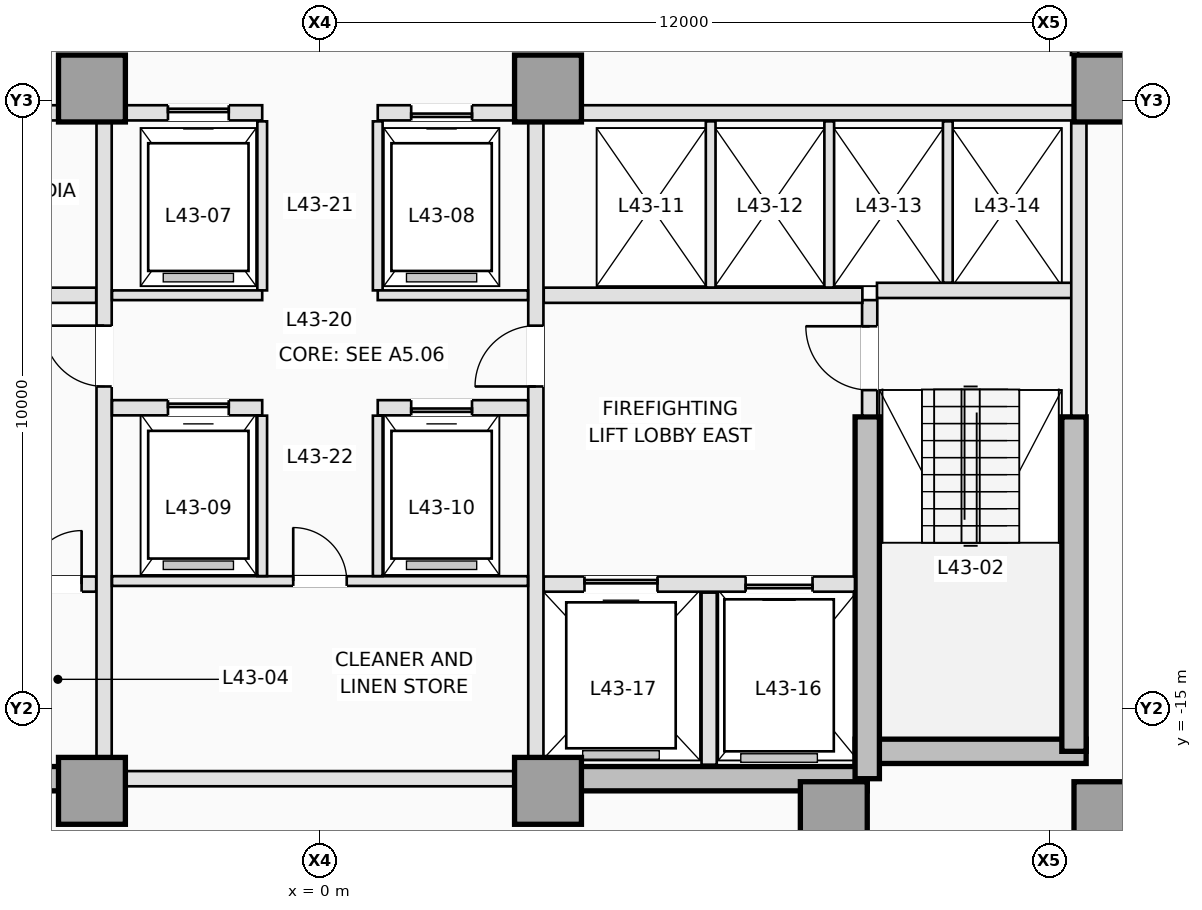
"""IFC4 building model, lengths in metres.
Left out: names, types, materials, properties, quantities, classifications, styles, units other than length and angle.
Written with IfcOpenShell. Run it as: python <this file> out.ifc"""

import sys

from ifc_helpers import new_model, si_unit, direction, frame, frame_2d, origin, origin_2d, place, context, subcontext, project, spatial, rectangle, extrude, element, fill, save


model = new_model("IFC4")
c1 = context("Model", 3, precision=1e-05, world=origin(), true_north=direction((0.0, 1.0)))
c2 = subcontext(c1, "Body", "Model", "MODEL_VIEW")
j1 = project(units=[si_unit("LENGTHUNIT", "METRE"), si_unit("PLANEANGLEUNIT", "RADIAN")], contexts=[c1])
p1 = place(None, origin())
s1 = spatial("IfcSite", under=j1, at=p1, CompositionType="ELEMENT")
p2 = place(p1, origin())
s2 = spatial("IfcBuilding", under=s1, at=p2, CompositionType="ELEMENT")
p3 = place(p2, frame((0.0, 0.0, 158.0)))
s3 = spatial("IfcBuildingStorey", under=s2, at=p3, CompositionType="ELEMENT", Elevation=158.0)
for number, where, z_axis, x_axis in (
    (1, (-9.0, -16.15, 0.0), (0.0, 0.0, 1.0), (1.0, 0.0, 0.0)),
    (2, (3.75, -16.15, 0.0), (0.0, 0.0, 1.0), (1.0, 0.0, 0.0)),
):
    element("IfcWall", number, at=place(p3, frame(where, z_axis=z_axis, x_axis=x_axis)), inside=s3, PredefinedType="SHEAR", context=c2, shape_type="SweptSolid", body=[
        extrude(rectangle(XDim=5.25, YDim=0.4, at=frame_2d((2.625, 0.0))), origin(), (0.0, 0.0, 1.0), 3.5),
    ])
p4 = place(p3, frame((8.8, -15.7, 0.0), z_axis=(0.0, 0.0, 1.0), x_axis=(1.0, 0.0, 0.0)))
e3 = element("IfcWall", 3, at=p4, inside=s3, PredefinedType="SHEAR", context=c2, shape_type="SweptSolid", body=[
    extrude(rectangle(XDim=3.8, YDim=0.4, at=frame_2d((1.9, 0.0))), origin(), (0.0, 0.0, 1.0), 3.5),
])
p5 = place(p3, frame((12.4, -15.7, 0.0), z_axis=(0.0, 0.0, 1.0), x_axis=(0.0, 1.0, 0.0)))
e4 = element("IfcWall", 4, at=p5, inside=s3, PredefinedType="SHEAR", context=c2, shape_type="SweptSolid", body=[
    extrude(rectangle(XDim=5.5, YDim=0.4, at=frame_2d((2.75, 0.0))), origin(), (0.0, 0.0, 1.0), 3.5),
])
p6 = place(p3, frame((9.0, -16.15, 0.0), z_axis=(0.0, 0.0, 1.0), x_axis=(0.0, 1.0, 0.0)))
e5 = element("IfcWall", 5, at=p6, inside=s3, PredefinedType="SHEAR", context=c2, shape_type="SweptSolid", body=[
    extrude(rectangle(XDim=5.95, YDim=0.4, at=frame_2d((2.975, 0.0))), origin(), (0.0, 0.0, 1.0), 3.5),
])
for number, where, z_axis, x_axis in (
    (6, (-3.75, -16.35, 0.0), (0.0, 0.0, 1.0), (1.0, 0.0, 0.0)),
    (7, (3.75, -16.35, 0.0), (0.0, 0.0, 1.0), (1.0, 0.0, 0.0)),
    (8, (8.45, -16.75, 0.0), (0.0, 0.0, 1.0), (1.0, 0.0, 0.0)),
    (9, (12.95, -16.75, 0.0), (0.0, 0.0, 1.0), (1.0, 0.0, 0.0)),
    (10, (-3.75, -4.8, 0.0), (0.0, 0.0, 1.0), (1.0, 0.0, 0.0)),
    (11, (3.75, -4.8, 0.0), (0.0, 0.0, 1.0), (1.0, 0.0, 0.0)),
    (12, (12.95, -4.8, 0.0), (0.0, 0.0, 1.0), (1.0, 0.0, 0.0)),
):
    element("IfcColumn", number, at=place(p3, frame(where, z_axis=z_axis, x_axis=x_axis)), inside=s3, PredefinedType="COLUMN", context=c2, shape_type="SweptSolid", body=[
        extrude(rectangle(XDim=1.1, YDim=1.1, at=origin_2d()), origin(), (0.0, 0.0, 1.0), 3.5),
    ])
p7 = place(p3, frame((9.04, -10.18, 0.0), z_axis=(0.0, 0.0, 1.0), x_axis=(0.0, 1.0, 0.0)))
e13 = element("IfcWall", 13, at=p7, inside=s3, PredefinedType="PARTITIONING", context=c2, shape_type="SweptSolid", body=[
    extrude(rectangle(XDim=1.9, YDim=0.25, at=frame_2d((0.95, 0.0))), origin(), (0.0, 0.0, 1.0), 3.25),
])
p8 = place(p7, frame((0.42, 0.0, 0.0)))
e14 = element("IfcOpeningElement", 14, at=p8, cuts=e13, PredefinedType="OPENING", context=c2, shape_type="SweptSolid", body=[
    extrude(rectangle(XDim=1.05, YDim=2.15, at=frame_2d((0.525, 1.075))), frame((0.0, 0.135, 0.0), z_axis=(0.0, -1.0, 0.0), x_axis=(1.0, 0.0, 0.0)), (0.0, 0.0, 1.0), 0.27),
])
p9 = place(p3, frame((9.16, -8.12, 0.0), z_axis=(0.0, 0.0, 1.0), x_axis=(1.0, 0.0, 0.0)))
e15 = element("IfcWall", 15, at=p9, inside=s3, PredefinedType="PARTITIONING", context=c2, shape_type="SweptSolid", body=[
    extrude(rectangle(XDim=3.22, YDim=0.25, at=frame_2d((1.61, 0.0))), origin(), (0.0, 0.0, 1.0), 3.25),
])
p10 = place(p3, frame((12.48, -10.18, 0.0), z_axis=(0.0, 0.0, 1.0), x_axis=(0.0, 1.0, 0.0)))
e16 = element("IfcWall", 16, at=p10, inside=s3, PredefinedType="PARTITIONING", context=c2, shape_type="SweptSolid", body=[
    extrude(rectangle(XDim=4.828, YDim=0.25, at=frame_2d((2.414, 0.0))), origin(), (0.0, 0.0, 1.0), 3.25),
])
p11 = place(p3, frame((-8.798, -12.95, 0.0), z_axis=(0.0, 0.0, 1.0), x_axis=(1.0, 0.0, 0.0)))
e17 = element("IfcWall", 17, at=p11, inside=s3, PredefinedType="PARTITIONING", context=c2, shape_type="SweptSolid", body=[
    extrude(rectangle(XDim=5.118, YDim=0.25, at=frame_2d((2.559, 0.0))), origin(), (0.0, 0.0, 1.0), 3.25),
])
p12 = place(p11, frame((0.698, 0.0, 0.0)))
e18 = element("IfcOpeningElement", 18, at=p12, cuts=e17, PredefinedType="OPENING", context=c2, shape_type="SweptSolid", body=[
    extrude(rectangle(XDim=1.1, YDim=2.15, at=frame_2d((0.55, 1.075))), frame((0.0, 0.135, 0.0), z_axis=(0.0, -1.0, 0.0), x_axis=(1.0, 0.0, 0.0)), (0.0, 0.0, 1.0), 0.27),
])
p13 = place(p11, frame((2.598, 0.0, 0.0)))
e19 = element("IfcOpeningElement", 19, at=p13, cuts=e17, PredefinedType="OPENING", context=c2, shape_type="SweptSolid", body=[
    extrude(rectangle(XDim=0.88, YDim=2.1, at=frame_2d((0.44, 1.05))), frame((0.0, 0.135, 0.0), z_axis=(0.0, -1.0, 0.0), x_axis=(1.0, 0.0, 0.0)), (0.0, 0.0, 1.0), 0.27),
])
p14 = place(p11, frame((3.998, 0.0, 0.0)))
e20 = element("IfcOpeningElement", 20, at=p14, cuts=e17, PredefinedType="OPENING", context=c2, shape_type="SweptSolid", body=[
    extrude(rectangle(XDim=0.88, YDim=2.1, at=frame_2d((0.44, 1.05))), frame((0.0, 0.135, 0.0), z_axis=(0.0, -1.0, 0.0), x_axis=(1.0, 0.0, 0.0)), (0.0, 0.0, 1.0), 0.27),
])
p15 = place(p3, frame((3.68, -12.95, 0.0), z_axis=(0.0, 0.0, 1.0), x_axis=(1.0, 0.0, 0.0)))
e21 = element("IfcWall", 21, at=p15, inside=s3, PredefinedType="PARTITIONING", context=c2, shape_type="SweptSolid", body=[
    extrude(rectangle(XDim=5.118, YDim=0.25, at=frame_2d((2.559, 0.0))), origin(), (0.0, 0.0, 1.0), 3.25),
])
p16 = place(p15, frame((3.32, 0.0, 0.0)))
e22 = element("IfcOpeningElement", 22, at=p16, cuts=e21, PredefinedType="OPENING", context=c2, shape_type="SweptSolid", body=[
    extrude(rectangle(XDim=1.1, YDim=2.15, at=frame_2d((0.55, 1.075))), frame((0.0, 0.135, 0.0), z_axis=(0.0, -1.0, 0.0), x_axis=(1.0, 0.0, 0.0)), (0.0, 0.0, 1.0), 0.27),
])
p17 = place(p15, frame((0.67, 0.0, 0.0)))
e23 = element("IfcOpeningElement", 23, at=p17, cuts=e21, PredefinedType="OPENING", context=c2, shape_type="SweptSolid", body=[
    extrude(rectangle(XDim=1.2, YDim=2.15, at=frame_2d((0.6, 1.075))), frame((0.0, 0.135, 0.0), z_axis=(0.0, -1.0, 0.0), x_axis=(1.0, 0.0, 0.0)), (0.0, 0.0, 1.0), 0.27),
])
p18 = place(p3, frame((6.4, -15.92, 0.0), z_axis=(0.0, 0.0, 1.0), x_axis=(0.0, 1.0, 0.0)))
e24 = element("IfcWall", 24, at=p18, inside=s3, PredefinedType="PARTITIONING", context=c2, shape_type="SweptSolid", body=[
    extrude(rectangle(XDim=2.83, YDim=0.25, at=frame_2d((1.415, 0.0))), origin(), (0.0, 0.0, 1.0), 3.25),
])
for number, where, z_axis, x_axis in (
    (25, (-8.92, -8.2, 0.0), (0.0, 0.0, 1.0), (1.0, 0.0, 0.0)),
    (26, (3.68, -8.2, 0.0), (0.0, 0.0, 1.0), (1.0, 0.0, 0.0)),
):
    element("IfcWall", number, at=place(p3, frame(where, z_axis=z_axis, x_axis=x_axis)), inside=s3, PredefinedType="PARTITIONING", context=c2, shape_type="SweptSolid", body=[
        extrude(rectangle(XDim=5.24, YDim=0.25, at=frame_2d((2.62, 0.0))), origin(), (0.0, 0.0, 1.0), 3.25),
    ])
p19 = place(p3, frame((-3.55, -15.798, 0.0), z_axis=(0.0, 0.0, 1.0), x_axis=(0.0, 1.0, 0.0)))
e27 = element("IfcWall", 27, at=p19, inside=s3, PredefinedType="PARTITIONING", context=c2, shape_type="SweptSolid", body=[
    extrude(rectangle(XDim=10.446, YDim=0.25, at=frame_2d((5.223, 0.0))), origin(), (0.0, 0.0, 1.0), 3.25),
])
p20 = place(p19, frame((6.098, 0.0, 0.0)))
e28 = element("IfcOpeningElement", 28, at=p20, cuts=e27, PredefinedType="OPENING", context=c2, shape_type="SweptSolid", body=[
    extrude(rectangle(XDim=1.0, YDim=2.15, at=frame_2d((0.5, 1.075))), frame((0.0, 0.135, 0.0), z_axis=(0.0, -1.0, 0.0), x_axis=(1.0, 0.0, 0.0)), (0.0, 0.0, 1.0), 0.27),
])
p21 = place(p3, frame((3.55, -15.798, 0.0), z_axis=(0.0, 0.0, 1.0), x_axis=(0.0, 1.0, 0.0)))
e29 = element("IfcWall", 29, at=p21, inside=s3, PredefinedType="PARTITIONING", context=c2, shape_type="SweptSolid", body=[
    extrude(rectangle(XDim=10.446, YDim=0.25, at=frame_2d((5.223, 0.0))), origin(), (0.0, 0.0, 1.0), 3.25),
])
p22 = place(p21, frame((6.098, 0.0, 0.0)))
e30 = element("IfcOpeningElement", 30, at=p22, cuts=e29, PredefinedType="OPENING", context=c2, shape_type="SweptSolid", body=[
    extrude(rectangle(XDim=1.0, YDim=2.15, at=frame_2d((0.5, 1.075))), frame((0.0, 0.135, 0.0), z_axis=(0.0, -1.0, 0.0), x_axis=(1.0, 0.0, 0.0)), (0.0, 0.0, 1.0), 0.27),
])
p23 = place(p3, frame((-12.398, -5.2, 0.0), z_axis=(0.0, 0.0, 1.0), x_axis=(1.0, 0.0, 0.0)))
e31 = element("IfcWall", 31, at=p23, inside=s3, PredefinedType="PARTITIONING", context=c2, shape_type="SweptSolid", body=[
    extrude(rectangle(XDim=8.096, YDim=0.25, at=frame_2d((4.048, 0.0))), origin(), (0.0, 0.0, 1.0), 3.25),
])
p24 = place(p23, frame((2.968, 0.0, 0.0)))
e32 = element("IfcOpeningElement", 32, at=p24, cuts=e31, PredefinedType="OPENING", context=c2, shape_type="SweptSolid", body=[
    extrude(rectangle(XDim=0.92, YDim=2.12, at=frame_2d((0.46, 1.06))), frame((0.0, 0.135, 0.0), z_axis=(0.0, -1.0, 0.0), x_axis=(1.0, 0.0, 0.0)), (0.0, 0.0, 1.0), 0.27),
])
p25 = place(p23, frame((6.068, 0.0, 0.0)))
e33 = element("IfcOpeningElement", 33, at=p25, cuts=e31, PredefinedType="OPENING", context=c2, shape_type="SweptSolid", body=[
    extrude(rectangle(XDim=0.92, YDim=2.12, at=frame_2d((0.46, 1.06))), frame((0.0, 0.135, 0.0), z_axis=(0.0, -1.0, 0.0), x_axis=(1.0, 0.0, 0.0)), (0.0, 0.0, 1.0), 0.27),
])
p26 = place(p3, frame((4.302, -5.2, 0.0), z_axis=(0.0, 0.0, 1.0), x_axis=(1.0, 0.0, 0.0)))
e34 = element("IfcWall", 34, at=p26, inside=s3, PredefinedType="PARTITIONING", context=c2, shape_type="SweptSolid", body=[
    extrude(rectangle(XDim=8.096, YDim=0.25, at=frame_2d((4.048, 0.0))), origin(), (0.0, 0.0, 1.0), 3.25),
])
p27 = place(p3, frame((-3.198, -5.2, 0.0), z_axis=(0.0, 0.0, 1.0), x_axis=(1.0, 0.0, 0.0)))
e35 = element("IfcWall", 35, at=p27, inside=s3, PredefinedType="PARTITIONING", context=c2, shape_type="SweptSolid", body=[
    extrude(rectangle(XDim=2.248, YDim=0.25, at=frame_2d((1.124, 0.0))), origin(), (0.0, 0.0, 1.0), 3.25),
])
p28 = place(p27, frame((0.698, 0.0, 0.0)))
e36 = element("IfcOpeningElement", 36, at=p28, cuts=e35, PredefinedType="OPENING", context=c2, shape_type="SweptSolid", body=[
    extrude(rectangle(XDim=1.0, YDim=2.15, at=frame_2d((0.5, 1.075))), frame((0.0, 0.135, 0.0), z_axis=(0.0, -1.0, 0.0), x_axis=(1.0, 0.0, 0.0)), (0.0, 0.0, 1.0), 0.27),
])
p29 = place(p3, frame((0.95, -5.2, 0.0), z_axis=(0.0, 0.0, 1.0), x_axis=(1.0, 0.0, 0.0)))
e37 = element("IfcWall", 37, at=p29, inside=s3, PredefinedType="PARTITIONING", context=c2, shape_type="SweptSolid", body=[
    extrude(rectangle(XDim=2.248, YDim=0.25, at=frame_2d((1.124, 0.0))), origin(), (0.0, 0.0, 1.0), 3.25),
])
p30 = place(p29, frame((0.55, 0.0, 0.0)))
e38 = element("IfcOpeningElement", 38, at=p30, cuts=e37, PredefinedType="OPENING", context=c2, shape_type="SweptSolid", body=[
    extrude(rectangle(XDim=1.0, YDim=2.15, at=frame_2d((0.5, 1.075))), frame((0.0, 0.135, 0.0), z_axis=(0.0, -1.0, 0.0), x_axis=(1.0, 0.0, 0.0)), (0.0, 0.0, 1.0), 0.27),
])
for number, where, z_axis, x_axis in (
    (39, (6.425, -8.073, 0.0), (0.0, 0.0, 1.0), (0.0, 1.0, 0.0)),
    (40, (8.375, -8.073, 0.0), (0.0, 0.0, 1.0), (0.0, 1.0, 0.0)),
):
    element("IfcWall", number, at=place(p3, frame(where, z_axis=z_axis, x_axis=x_axis)), inside=s3, PredefinedType="PARTITIONING", context=c2, shape_type="SweptSolid", body=[
        extrude(rectangle(XDim=2.733, YDim=0.16, at=frame_2d((1.366, 0.0))), origin(), (0.0, 0.0, 1.0), 3.25),
    ])
p31 = place(p3, frame((10.325, -7.993, 0.0), z_axis=(0.0, 0.0, 1.0), x_axis=(0.0, 1.0, 0.0)))
e41 = element("IfcWall", 41, at=p31, inside=s3, PredefinedType="PARTITIONING", context=c2, shape_type="SweptSolid", body=[
    extrude(rectangle(XDim=2.653, YDim=0.16, at=frame_2d((1.326, 0.0))), origin(), (0.0, 0.0, 1.0), 3.25),
])
p32 = place(p3, frame((-3.198, -16.15, 0.0), z_axis=(0.0, 0.0, 1.0), x_axis=(1.0, 0.0, 0.0)))
e42 = element("IfcWall", 42, at=p32, inside=s3, PredefinedType="PARTITIONING", context=c2, shape_type="SweptSolid", body=[
    extrude(rectangle(XDim=6.396, YDim=0.25, at=frame_2d((3.198, 0.0))), origin(), (0.0, 0.0, 1.0), 2.45),
])
for number, where, z_axis, x_axis in (
    (43, (-0.95, -8.12, 0.0), (0.0, 0.0, 1.0), (0.0, 1.0, 0.0)),
    (44, (0.95, -8.12, 0.0), (0.0, 0.0, 1.0), (0.0, 1.0, 0.0)),
):
    element("IfcWall", number, at=place(p3, frame(where, z_axis=z_axis, x_axis=x_axis)), inside=s3, PredefinedType="PARTITIONING", context=c2, shape_type="SweptSolid", body=[
        extrude(rectangle(XDim=2.78, YDim=0.16, at=frame_2d((1.39, 0.0))), origin(), (0.0, 0.0, 1.0), 3.25),
    ])
for number, where, z_axis, x_axis in (
    (45, (-3.42, -8.2, 0.0), (0.0, 0.0, 1.0), (1.0, 0.0, 0.0)),
    (46, (0.95, -8.2, 0.0), (0.0, 0.0, 1.0), (1.0, 0.0, 0.0)),
):
    element("IfcWall", number, at=place(p3, frame(where, z_axis=z_axis, x_axis=x_axis)), inside=s3, PredefinedType="PARTITIONING", context=c2, shape_type="SweptSolid", body=[
        extrude(rectangle(XDim=2.47, YDim=0.16, at=frame_2d((1.235, 0.0))), origin(), (0.0, 0.0, 1.0), 3.25),
    ])
p33 = place(p3, frame((-3.42, -10.05, 0.0), z_axis=(0.0, 0.0, 1.0), x_axis=(1.0, 0.0, 0.0)))
e47 = element("IfcWall", 47, at=p33, inside=s3, PredefinedType="PARTITIONING", context=c2, shape_type="SweptSolid", body=[
    extrude(rectangle(XDim=2.47, YDim=0.25, at=frame_2d((1.235, 0.0))), origin(), (0.0, 0.0, 1.0), 3.25),
])
p34 = place(p33, frame((0.92, 0.0, 0.0)))
e48 = element("IfcOpeningElement", 48, at=p34, cuts=e47, PredefinedType="OPENING", context=c2, shape_type="SweptSolid", body=[
    extrude(rectangle(XDim=1.0, YDim=2.15, at=frame_2d((0.5, 1.075))), frame((0.0, 0.135, 0.0), z_axis=(0.0, -1.0, 0.0), x_axis=(1.0, 0.0, 0.0)), (0.0, 0.0, 1.0), 0.27),
])
p35 = place(p3, frame((0.95, -10.05, 0.0), z_axis=(0.0, 0.0, 1.0), x_axis=(1.0, 0.0, 0.0)))
e49 = element("IfcWall", 49, at=p35, inside=s3, PredefinedType="PARTITIONING", context=c2, shape_type="SweptSolid", body=[
    extrude(rectangle(XDim=2.47, YDim=0.25, at=frame_2d((1.235, 0.0))), origin(), (0.0, 0.0, 1.0), 3.25),
])
p36 = place(p35, frame((0.55, 0.0, 0.0)))
e50 = element("IfcOpeningElement", 50, at=p36, cuts=e49, PredefinedType="OPENING", context=c2, shape_type="SweptSolid", body=[
    extrude(rectangle(XDim=1.0, YDim=2.15, at=frame_2d((0.5, 1.075))), frame((0.0, 0.135, 0.0), z_axis=(0.0, -1.0, 0.0), x_axis=(1.0, 0.0, 0.0)), (0.0, 0.0, 1.0), 0.27),
])
p37 = place(p3, frame((-3.42, -12.9, 0.0), z_axis=(0.0, 0.0, 1.0), x_axis=(1.0, 0.0, 0.0)))
e51 = element("IfcWall", 51, at=p37, inside=s3, PredefinedType="PARTITIONING", context=c2, shape_type="SweptSolid", body=[
    extrude(rectangle(XDim=6.84, YDim=0.16, at=frame_2d((3.42, 0.0))), origin(), (0.0, 0.0, 1.0), 3.25),
])
p38 = place(p37, frame((2.98, 0.0, 0.0)))
e52 = element("IfcOpeningElement", 52, at=p38, cuts=e51, PredefinedType="OPENING", context=c2, shape_type="SweptSolid", body=[
    extrude(rectangle(XDim=0.88, YDim=2.12, at=frame_2d((0.44, 1.06))), frame((0.0, 0.09, 0.0), z_axis=(0.0, -1.0, 0.0), x_axis=(1.0, 0.0, 0.0)), (0.0, 0.0, 1.0), 0.18),
])
for number, where, z_axis, x_axis in (
    (53, (-0.95, -12.818, 0.0), (0.0, 0.0, 1.0), (0.0, 1.0, 0.0)),
    (54, (0.95, -12.818, 0.0), (0.0, 0.0, 1.0), (0.0, 1.0, 0.0)),
):
    element("IfcWall", number, at=place(p3, frame(where, z_axis=z_axis, x_axis=x_axis)), inside=s3, PredefinedType="PARTITIONING", context=c2, shape_type="SweptSolid", body=[
        extrude(rectangle(XDim=2.638, YDim=0.16, at=frame_2d((1.319, 0.0))), origin(), (0.0, 0.0, 1.0), 3.25),
    ])
p39 = place(p3, frame((12.41, -2.462, 0.0), z_axis=(0.0, 0.0, 1.0), x_axis=(0.0, -1.0, 0.0)))
e55 = element("IfcWall", 55, at=p39, inside=s3, PredefinedType="PARTITIONING", context=c2, shape_type="SweptSolid", body=[
    extrude(rectangle(XDim=1.786, YDim=0.12, at=frame_2d((0.893, 0.0))), origin(), (0.0, 0.0, 1.0), 3.25),
])
p40 = place(p39, frame((0.623, 0.0, 0.0)))
e56 = element("IfcOpeningElement", 56, at=p40, cuts=e55, PredefinedType="OPENING", context=c2, shape_type="SweptSolid", body=[
    extrude(rectangle(XDim=0.92, YDim=2.12, at=frame_2d((0.46, 1.06))), frame((0.0, 0.07, 0.0), z_axis=(0.0, -1.0, 0.0), x_axis=(1.0, 0.0, 0.0)), (0.0, 0.0, 1.0), 0.14),
])
p41 = place(p28, origin())
e57 = element("IfcDoor", 57, at=p41, inside=s3, OperationType="SLIDING_TO_LEFT", PredefinedType="DOOR", context=c2, shape_type="SweptSolid", body=[
    extrude(rectangle(XDim=1.0, YDim=2.15, at=frame_2d((0.5, 1.075))), frame((0.0, 0.025, 0.0), z_axis=(0.0, -1.0, 0.0), x_axis=(1.0, 0.0, 0.0)), (0.0, 0.0, 1.0), 0.05),
])
fill(e36, e57)
p42 = place(p30, origin())
e58 = element("IfcDoor", 58, at=p42, inside=s3, OperationType="SLIDING_TO_RIGHT", PredefinedType="DOOR", context=c2, shape_type="SweptSolid", body=[
    extrude(rectangle(XDim=1.0, YDim=2.15, at=frame_2d((0.5, 1.075))), frame((0.0, 0.025, 0.0), z_axis=(0.0, -1.0, 0.0), x_axis=(1.0, 0.0, 0.0)), (0.0, 0.0, 1.0), 0.05),
])
fill(e38, e58)
p43 = place(p16, origin())
e59 = element("IfcDoor", 59, at=p43, inside=s3, OperationType="SLIDING_TO_RIGHT", PredefinedType="DOOR", context=c2, shape_type="SweptSolid", body=[
    extrude(rectangle(XDim=1.1, YDim=2.15, at=frame_2d((0.55, 1.075))), frame((0.0, 0.025, 0.0), z_axis=(0.0, -1.0, 0.0), x_axis=(1.0, 0.0, 0.0)), (0.0, 0.0, 1.0), 0.05),
])
fill(e22, e59)
p44 = place(p17, origin())
e60 = element("IfcDoor", 60, at=p44, inside=s3, OperationType="SLIDING_TO_LEFT", PredefinedType="DOOR", context=c2, shape_type="SweptSolid", body=[
    extrude(rectangle(XDim=1.2, YDim=2.15, at=frame_2d((0.6, 1.075))), frame((0.0, 0.025, 0.0), z_axis=(0.0, -1.0, 0.0), x_axis=(1.0, 0.0, 0.0)), (0.0, 0.0, 1.0), 0.05),
])
fill(e23, e60)
p45 = place(p34, origin())
e61 = element("IfcDoor", 61, at=p45, inside=s3, OperationType="SLIDING_TO_LEFT", PredefinedType="DOOR", context=c2, shape_type="SweptSolid", body=[
    extrude(rectangle(XDim=1.0, YDim=2.15, at=frame_2d((0.5, 1.075))), frame((0.0, 0.025, 0.0), z_axis=(0.0, -1.0, 0.0), x_axis=(1.0, 0.0, 0.0)), (0.0, 0.0, 1.0), 0.05),
])
fill(e48, e61)
p46 = place(p36, origin())
e62 = element("IfcDoor", 62, at=p46, inside=s3, OperationType="SLIDING_TO_RIGHT", PredefinedType="DOOR", context=c2, shape_type="SweptSolid", body=[
    extrude(rectangle(XDim=1.0, YDim=2.15, at=frame_2d((0.5, 1.075))), frame((0.0, 0.025, 0.0), z_axis=(0.0, -1.0, 0.0), x_axis=(1.0, 0.0, 0.0)), (0.0, 0.0, 1.0), 0.05),
])
fill(e50, e62)
p47 = place(p8, origin())
e63 = element("IfcDoor", 63, at=p47, inside=s3, OperationType="SINGLE_SWING_RIGHT", PredefinedType="DOOR", context=c2, shape_type="SweptSolid", body=[
    extrude(rectangle(XDim=1.05, YDim=2.15, at=frame_2d((0.525, 1.075))), frame((0.0, 0.025, 0.0), z_axis=(0.0, -1.0, 0.0), x_axis=(1.0, 0.0, 0.0)), (0.0, 0.0, 1.0), 0.05),
])
fill(e14, e63)
p48 = place(p14, origin())
e64 = element("IfcDoor", 64, at=p48, inside=s3, OperationType="SINGLE_SWING_RIGHT", PredefinedType="TRAPDOOR", context=c2, shape_type="SweptSolid", body=[
    extrude(rectangle(XDim=0.88, YDim=2.1, at=frame_2d((0.44, 1.05))), frame((0.0, 0.025, 0.0), z_axis=(0.0, -1.0, 0.0), x_axis=(1.0, 0.0, 0.0)), (0.0, 0.0, 1.0), 0.05),
])
fill(e20, e64)
p49 = place(p20, origin())
e65 = element("IfcDoor", 65, at=p49, inside=s3, OperationType="SINGLE_SWING_RIGHT", PredefinedType="DOOR", context=c2, shape_type="SweptSolid", body=[
    extrude(rectangle(XDim=1.0, YDim=2.15, at=frame_2d((0.5, 1.075))), frame((0.0, 0.025, 0.0), z_axis=(0.0, -1.0, 0.0), x_axis=(1.0, 0.0, 0.0)), (0.0, 0.0, 1.0), 0.05),
])
fill(e28, e65)
p50 = place(p22, origin())
e66 = element("IfcDoor", 66, at=p50, inside=s3, OperationType="SINGLE_SWING_LEFT", PredefinedType="DOOR", context=c2, shape_type="SweptSolid", body=[
    extrude(rectangle(XDim=1.0, YDim=2.15, at=frame_2d((0.5, 1.075))), frame((0.0, 0.025, 0.0), z_axis=(0.0, -1.0, 0.0), x_axis=(1.0, 0.0, 0.0)), (0.0, 0.0, 1.0), 0.05),
])
fill(e30, e66)
p51 = place(p38, origin())
e67 = element("IfcDoor", 67, at=p51, inside=s3, OperationType="SINGLE_SWING_LEFT", PredefinedType="DOOR", context=c2, shape_type="SweptSolid", body=[
    extrude(rectangle(XDim=0.88, YDim=2.12, at=frame_2d((0.44, 1.06))), frame((0.0, 0.025, 0.0), z_axis=(0.0, -1.0, 0.0), x_axis=(1.0, 0.0, 0.0)), (0.0, 0.0, 1.0), 0.05),
])
fill(e52, e67)
save(model, sys.argv[1])
